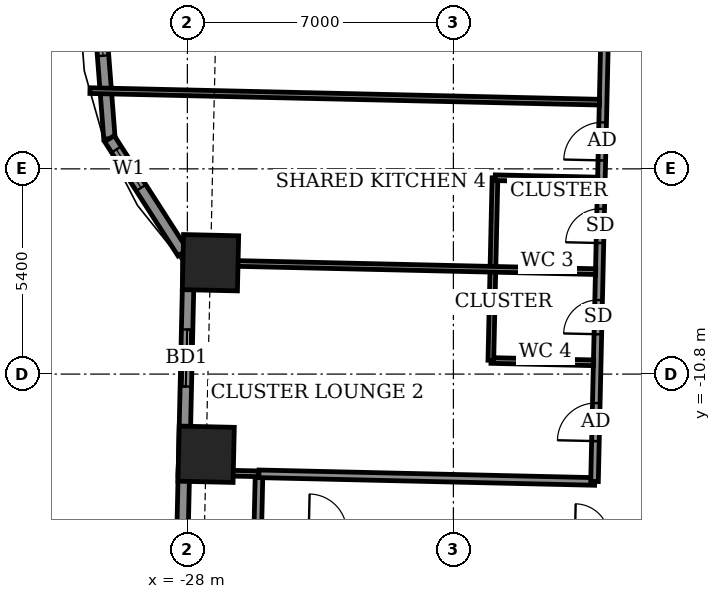
"""IFC4 building model, lengths in metres.
Left out: names, types, materials, properties, quantities, classifications, styles, units other than length and angle.
Written with IfcOpenShell. Run it as: python <this file> out.ifc"""

import sys

from ifc_helpers import new_model, si_unit, direction, frame, frame_2d, origin, origin_2d, place, context, subcontext, project, spatial, rectangle, extrude, element, fill, save


model = new_model("IFC4")
c1 = context("Model", 3, precision=1e-05, world=origin(), true_north=direction((0.0, 1.0)))
c2 = subcontext(c1, "Body", "Model", "MODEL_VIEW")
j1 = project(units=[si_unit("LENGTHUNIT", "METRE"), si_unit("PLANEANGLEUNIT", "RADIAN")], contexts=[c1])
p1 = place(None, origin())
s1 = spatial("IfcSite", under=j1, at=p1, CompositionType="ELEMENT")
p2 = place(p1, origin())
s2 = spatial("IfcBuilding", under=s1, at=p2, CompositionType="ELEMENT")
p3 = place(p2, frame((0.0, 0.0, 71.1)))
s3 = spatial("IfcBuildingStorey", under=s2, at=p3, CompositionType="ELEMENT", Elevation=71.1)
for number, where, z_axis, x_axis in (
    (1, (-27.391, -7.869, -0.55), (0.0, 0.0, 1.0), (-0.023, -1.0, 0.0)),
    (2, (-27.506, -12.909, -0.55), (0.0, 0.0, 1.0), (-0.023, -1.0, 0.0)),
):
    element("IfcColumn", number, at=place(p3, frame(where, z_axis=z_axis, x_axis=x_axis)), inside=s3, PredefinedType="COLUMN", context=c2, shape_type="SweptSolid", body=[
        extrude(rectangle(XDim=1.45, YDim=1.45, at=origin_2d()), origin(), (0.0, 0.0, 1.0), 3.6),
    ])
p4 = place(p3, frame((-30.479, 0.952, 0.0), z_axis=(0.0, 0.0, 1.0), x_axis=(0.076964476481, -0.997033835614, 0.0)))
e3 = element("IfcWall", 3, at=p4, inside=s3, PredefinedType="SOLIDWALL", context=c2, shape_type="SweptSolid", body=[
    extrude(rectangle(XDim=5.573, YDim=0.3, at=frame_2d((2.787, 0.0))), origin(), (0.0, 0.0, 1.0), 3.05),
])
p5 = place(p4, frame((2.186, 0.0, 0.9)))
e4 = element("IfcOpeningElement", 4, at=p5, cuts=e3, PredefinedType="OPENING", context=c2, shape_type="SweptSolid", body=[
    extrude(rectangle(XDim=1.2, YDim=1.5, at=frame_2d((0.6, 0.75))), frame((0.0, 0.16, 0.0), z_axis=(0.0, -1.0, 0.0), x_axis=(1.0, 0.0, 0.0)), (0.0, 0.0, 1.0), 0.32),
])
p6 = place(p3, frame((-30.05, -4.605, 0.0), z_axis=(0.0, 0.0, 1.0), x_axis=(0.540653885242, -0.841245134532, 0.0)))
e5 = element("IfcWall", 5, at=p6, inside=s3, PredefinedType="SOLIDWALL", context=c2, shape_type="SweptSolid", body=[
    extrude(rectangle(XDim=3.57, YDim=0.3, at=frame_2d((1.785, 0.0))), origin(), (0.0, 0.0, 1.0), 3.05),
])
p7 = place(p6, frame((0.338, 0.0, 0.9)))
e6 = element("IfcOpeningElement", 6, at=p7, cuts=e5, PredefinedType="OPENING", context=c2, shape_type="SweptSolid", body=[
    extrude(rectangle(XDim=1.2, YDim=1.5, at=frame_2d((0.6, 0.75))), frame((0.0, 0.16, 0.0), z_axis=(0.0, -1.0, 0.0), x_axis=(1.0, 0.0, 0.0)), (0.0, 0.0, 1.0), 0.32),
])
p8 = place(p3, frame((-27.965, -7.802, 0.0), z_axis=(0.0, 0.0, 1.0), x_axis=(-0.02267786199, -0.999742824218, 0.0)))
e7 = element("IfcWall", 7, at=p8, inside=s3, PredefinedType="SOLIDWALL", context=c2, shape_type="SweptSolid", body=[
    extrude(rectangle(XDim=15.029, YDim=0.3, at=frame_2d((7.514, 0.0))), origin(), (0.0, 0.0, 1.0), 3.05),
])
p9 = place(p8, frame((1.826, 0.0, 0.0)))
e8 = element("IfcOpeningElement", 8, at=p9, cuts=e7, PredefinedType="OPENING", context=c2, shape_type="SweptSolid", body=[
    extrude(rectangle(XDim=1.5, YDim=2.4, at=frame_2d((0.75, 1.2))), frame((0.0, 0.16, 0.0), z_axis=(0.0, -1.0, 0.0), x_axis=(1.0, 0.0, 0.0)), (0.0, 0.0, 1.0), 0.32),
])
p10 = place(p8, frame((11.071, 0.0, 0.9)))
e9 = element("IfcOpeningElement", 9, at=p10, cuts=e7, PredefinedType="OPENING", context=c2, shape_type="SweptSolid", body=[
    extrude(rectangle(XDim=2.4, YDim=1.5, at=frame_2d((1.2, 0.75))), frame((0.0, 0.16, 0.0), z_axis=(0.0, -1.0, 0.0), x_axis=(1.0, 0.0, 0.0)), (0.0, 0.0, 1.0), 0.32),
])
p11 = place(p3, frame((-30.915, -15.916, 0.0), z_axis=(0.0, 0.0, 1.0), x_axis=(0.022662255828, 0.999743178102, 0.0)))
e10 = element("IfcWall", 10, at=p11, inside=s3, PredefinedType="USERDEFINED", context=c2, shape_type="SweptSolid", body=[
    extrude(rectangle(XDim=6.0, YDim=0.55, at=frame_2d((3.0, 0.0))), origin(), (0.0, 0.0, 1.0), 0.8),
])
p12 = place(p3, frame((-26.148, -14.924, 0.0), z_axis=(0.0, 0.0, 1.0), x_axis=(0.022617910375, 0.999744182344, 0.0)))
e11 = element("IfcWall", 11, at=p12, inside=s3, PredefinedType="PARTITIONING", context=c2, shape_type="SweptSolid", body=[
    extrude(rectangle(XDim=1.5, YDim=0.2, at=frame_2d((0.75, 0.0))), origin(), (0.0, 0.0, 1.0), 3.05),
])
p13 = place(p3, frame((-28.242, -13.376, 0.0), z_axis=(0.0, 0.0, 1.0), x_axis=(0.999743965862, -0.022627477169, 0.0)))
e12 = element("IfcWall", 12, at=p13, inside=s3, PredefinedType="PARTITIONING", context=c2, shape_type="SweptSolid", body=[
    extrude(rectangle(XDim=2.125, YDim=0.15, at=frame_2d((1.063, 0.0))), origin(), (0.0, 0.0, 1.0), 3.05),
])
p14 = place(p3, frame((-26.117, -13.424, 0.0), z_axis=(0.0, 0.0, 1.0), x_axis=(0.999741493133, -0.022736466476, 0.0)))
e13 = element("IfcWall", 13, at=p14, inside=s3, PredefinedType="PARTITIONING", context=c2, shape_type="SweptSolid", body=[
    extrude(rectangle(XDim=8.837, YDim=0.2, at=frame_2d((4.418, 0.0))), origin(), (0.0, 0.0, 1.0), 3.05),
])
p15 = place(p3, frame((-17.287, -13.625, 0.0), z_axis=(0.0, 0.0, 1.0), x_axis=(0.022712214871, 0.999742044377, 0.0)))
e14 = element("IfcWall", 14, at=p15, inside=s3, PredefinedType="PARTITIONING", context=c2, shape_type="SweptSolid", body=[
    extrude(rectangle(XDim=26.551, YDim=0.2, at=frame_2d((13.275, 0.0))), origin(), (0.0, 0.0, 1.0), 3.05),
])
p16 = place(p15, frame((22.738, 0.0, 0.0)))
e15 = element("IfcOpeningElement", 15, at=p16, cuts=e14, PredefinedType="OPENING", context=c2, shape_type="SweptSolid", body=[
    extrude(rectangle(XDim=1.0, YDim=2.1, at=frame_2d((0.5, 1.05))), frame((0.0, 0.11, 0.0), z_axis=(0.0, -1.0, 0.0), x_axis=(1.0, 0.0, 0.0)), (0.0, 0.0, 1.0), 0.22),
])
p17 = place(p15, frame((24.9, 0.0, 0.0)))
e16 = element("IfcOpeningElement", 16, at=p17, cuts=e14, PredefinedType="OPENING", context=c2, shape_type="SweptSolid", body=[
    extrude(rectangle(XDim=0.9, YDim=2.1, at=frame_2d((0.45, 1.05))), frame((0.0, 0.11, 0.0), z_axis=(0.0, -1.0, 0.0), x_axis=(1.0, 0.0, 0.0)), (0.0, 0.0, 1.0), 0.22),
])
p18 = place(p15, frame((20.3, 0.0, 0.0)))
e17 = element("IfcOpeningElement", 17, at=p18, cuts=e14, PredefinedType="OPENING", context=c2, shape_type="SweptSolid", body=[
    extrude(rectangle(XDim=1.0, YDim=2.1, at=frame_2d((0.5, 1.05))), frame((0.0, 0.11, 0.0), z_axis=(0.0, -1.0, 0.0), x_axis=(1.0, 0.0, 0.0)), (0.0, 0.0, 1.0), 0.22),
])
p19 = place(p15, frame((15.025, 0.0, 0.0)))
e18 = element("IfcOpeningElement", 18, at=p19, cuts=e14, PredefinedType="OPENING", context=c2, shape_type="SweptSolid", body=[
    extrude(rectangle(XDim=1.0, YDim=2.1, at=frame_2d((0.5, 1.05))), frame((0.0, 0.11, 0.0), z_axis=(0.0, -1.0, 0.0), x_axis=(1.0, 0.0, 0.0)), (0.0, 0.0, 1.0), 0.22),
])
p20 = place(p15, frame((17.525, 0.0, 0.0)))
e19 = element("IfcOpeningElement", 19, at=p20, cuts=e14, PredefinedType="OPENING", context=c2, shape_type="SweptSolid", body=[
    extrude(rectangle(XDim=0.9, YDim=2.1, at=frame_2d((0.45, 1.05))), frame((0.0, 0.11, 0.0), z_axis=(0.0, -1.0, 0.0), x_axis=(1.0, 0.0, 0.0)), (0.0, 0.0, 1.0), 0.22),
])
p21 = place(p15, frame((11.678, 0.0, 0.0)))
e20 = element("IfcOpeningElement", 20, at=p21, cuts=e14, PredefinedType="OPENING", context=c2, shape_type="SweptSolid", body=[
    extrude(rectangle(XDim=1.0, YDim=2.1, at=frame_2d((0.5, 1.05))), frame((0.0, 0.11, 0.0), z_axis=(0.0, -1.0, 0.0), x_axis=(1.0, 0.0, 0.0)), (0.0, 0.0, 1.0), 0.22),
])
p22 = place(p15, frame((8.45, 0.0, 0.0)))
e21 = element("IfcOpeningElement", 21, at=p22, cuts=e14, PredefinedType="OPENING", context=c2, shape_type="SweptSolid", body=[
    extrude(rectangle(XDim=1.0, YDim=2.1, at=frame_2d((0.5, 1.05))), frame((0.0, 0.11, 0.0), z_axis=(0.0, -1.0, 0.0), x_axis=(1.0, 0.0, 0.0)), (0.0, 0.0, 1.0), 0.22),
])
p23 = place(p15, frame((6.275, 0.0, 0.0)))
e22 = element("IfcOpeningElement", 22, at=p23, cuts=e14, PredefinedType="OPENING", context=c2, shape_type="SweptSolid", body=[
    extrude(rectangle(XDim=0.9, YDim=2.1, at=frame_2d((0.45, 1.05))), frame((0.0, 0.11, 0.0), z_axis=(0.0, -1.0, 0.0), x_axis=(1.0, 0.0, 0.0)), (0.0, 0.0, 1.0), 0.22),
])
p24 = place(p15, frame((1.062, 0.0, 0.0)))
e23 = element("IfcOpeningElement", 23, at=p24, cuts=e14, PredefinedType="OPENING", context=c2, shape_type="SweptSolid", body=[
    extrude(rectangle(XDim=1.0, YDim=2.1, at=frame_2d((0.5, 1.05))), frame((0.0, 0.11, 0.0), z_axis=(0.0, -1.0, 0.0), x_axis=(1.0, 0.0, 0.0)), (0.0, 0.0, 1.0), 0.22),
])
p25 = place(p15, frame((3.875, 0.0, 0.0)))
e24 = element("IfcOpeningElement", 24, at=p25, cuts=e14, PredefinedType="OPENING", context=c2, shape_type="SweptSolid", body=[
    extrude(rectangle(XDim=0.9, YDim=2.1, at=frame_2d((0.45, 1.05))), frame((0.0, 0.11, 0.0), z_axis=(0.0, -1.0, 0.0), x_axis=(1.0, 0.0, 0.0)), (0.0, 0.0, 1.0), 0.22),
])
p26 = place(p3, frame((-20.01, -10.442, 0.0), z_axis=(0.0, 0.0, 1.0), x_axis=(0.999744396973, -0.02260842146, 0.0)))
e25 = element("IfcWall", 25, at=p26, inside=s3, PredefinedType="PARTITIONING", context=c2, shape_type="SweptSolid", body=[
    extrude(rectangle(XDim=2.7, YDim=0.15, at=frame_2d((1.35, 0.0))), origin(), (0.0, 0.0, 1.0), 3.05),
])
p27 = place(p3, frame((-20.015, -10.437, 0.0), z_axis=(0.0, 0.0, 1.0), x_axis=(0.022683280499, 0.999742701292, 0.0)))
e26 = element("IfcWall", 26, at=p27, inside=s3, PredefinedType="PARTITIONING", context=c2, shape_type="SweptSolid", body=[
    extrude(rectangle(XDim=4.8, YDim=0.15, at=frame_2d((2.4, 0.0))), origin(), (0.0, 0.0, 1.0), 3.05),
])
p28 = place(p3, frame((-28.116, -7.857, 0.0), z_axis=(0.0, 0.0, 1.0), x_axis=(0.999741301527, -0.022744890004, 0.0)))
e27 = element("IfcWall", 27, at=p28, inside=s3, PredefinedType="PARTITIONING", context=c2, shape_type="SweptSolid", body=[
    extrude(rectangle(XDim=10.863, YDim=0.15, at=frame_2d((5.431, 0.0))), origin(), (0.0, 0.0, 1.0), 3.05),
])
p29 = place(p3, frame((-19.901, -5.633, 0.0), z_axis=(0.0, 0.0, 1.0), x_axis=(0.999744396973, -0.02260842146, 0.0)))
e28 = element("IfcWall", 28, at=p29, inside=s3, PredefinedType="PARTITIONING", context=c2, shape_type="SweptSolid", body=[
    extrude(rectangle(XDim=2.7, YDim=0.15, at=frame_2d((1.35, 0.0))), origin(), (0.0, 0.0, 1.0), 3.05),
])
p30 = place(p3, frame((-30.563, -3.341, 0.0), z_axis=(0.0, 0.0, 1.0), x_axis=(0.999743140217, -0.022663927048, 0.0)))
e29 = element("IfcWall", 29, at=p30, inside=s3, PredefinedType="PARTITIONING", context=c2, shape_type="SweptSolid", body=[
    extrude(rectangle(XDim=13.411, YDim=0.15, at=frame_2d((6.706, 0.0))), origin(), (0.0, 0.0, 1.0), 2.05),
])
p31 = place(p5, origin())
e30 = element("IfcWindow", 30, at=p31, inside=s3, PartitioningType="SINGLE_PANEL", PredefinedType="WINDOW", context=c2, shape_type="SweptSolid", body=[
    extrude(rectangle(XDim=1.2, YDim=1.5, at=frame_2d((0.6, 0.75))), frame((0.0, 0.03, 0.0), z_axis=(0.0, -1.0, 0.0), x_axis=(1.0, 0.0, 0.0)), (0.0, 0.0, 1.0), 0.06),
])
fill(e4, e30)
p32 = place(p7, origin())
e31 = element("IfcWindow", 31, at=p32, inside=s3, PartitioningType="SINGLE_PANEL", PredefinedType="WINDOW", context=c2, shape_type="SweptSolid", body=[
    extrude(rectangle(XDim=1.2, YDim=1.5, at=frame_2d((0.6, 0.75))), frame((0.0, 0.03, 0.0), z_axis=(0.0, -1.0, 0.0), x_axis=(1.0, 0.0, 0.0)), (0.0, 0.0, 1.0), 0.06),
])
fill(e6, e31)
p33 = place(p9, origin())
e32 = element("IfcDoor", 32, at=p33, inside=s3, OperationType="SLIDING_TO_LEFT", PredefinedType="DOOR", context=c2, shape_type="SweptSolid", body=[
    extrude(rectangle(XDim=1.5, YDim=2.4, at=frame_2d((0.75, 1.2))), frame((0.0, 0.025, 0.0), z_axis=(0.0, -1.0, 0.0), x_axis=(1.0, 0.0, 0.0)), (0.0, 0.0, 1.0), 0.05),
])
fill(e8, e32)
p34 = place(p22, origin())
e33 = element("IfcDoor", 33, at=p34, inside=s3, OperationType="SINGLE_SWING_LEFT", PredefinedType="DOOR", context=c2, shape_type="SweptSolid", body=[
    extrude(rectangle(XDim=1.0, YDim=2.1, at=frame_2d((0.5, 1.05))), frame((0.0, 0.025, 0.0), z_axis=(0.0, -1.0, 0.0), x_axis=(1.0, 0.0, 0.0)), (0.0, 0.0, 1.0), 0.05),
])
fill(e21, e33)
p35 = place(p23, origin())
e34 = element("IfcDoor", 34, at=p35, inside=s3, OperationType="SINGLE_SWING_LEFT", PredefinedType="DOOR", context=c2, shape_type="SweptSolid", body=[
    extrude(rectangle(XDim=0.9, YDim=2.1, at=frame_2d((0.45, 1.05))), frame((0.0, 0.025, 0.0), z_axis=(0.0, -1.0, 0.0), x_axis=(1.0, 0.0, 0.0)), (0.0, 0.0, 1.0), 0.05),
])
fill(e22, e34)
p36 = place(p24, origin())
e35 = element("IfcDoor", 35, at=p36, inside=s3, OperationType="SINGLE_SWING_RIGHT", PredefinedType="DOOR", context=c2, shape_type="SweptSolid", body=[
    extrude(rectangle(XDim=1.0, YDim=2.1, at=frame_2d((0.5, 1.05))), frame((0.0, 0.025, 0.0), z_axis=(0.0, -1.0, 0.0), x_axis=(1.0, 0.0, 0.0)), (0.0, 0.0, 1.0), 0.05),
])
fill(e23, e35)
p37 = place(p25, origin())
e36 = element("IfcDoor", 36, at=p37, inside=s3, OperationType="SINGLE_SWING_RIGHT", PredefinedType="DOOR", context=c2, shape_type="SweptSolid", body=[
    extrude(rectangle(XDim=0.9, YDim=2.1, at=frame_2d((0.45, 1.05))), frame((0.0, 0.025, 0.0), z_axis=(0.0, -1.0, 0.0), x_axis=(1.0, 0.0, 0.0)), (0.0, 0.0, 1.0), 0.05),
])
fill(e24, e36)
save(model, sys.argv[1])
